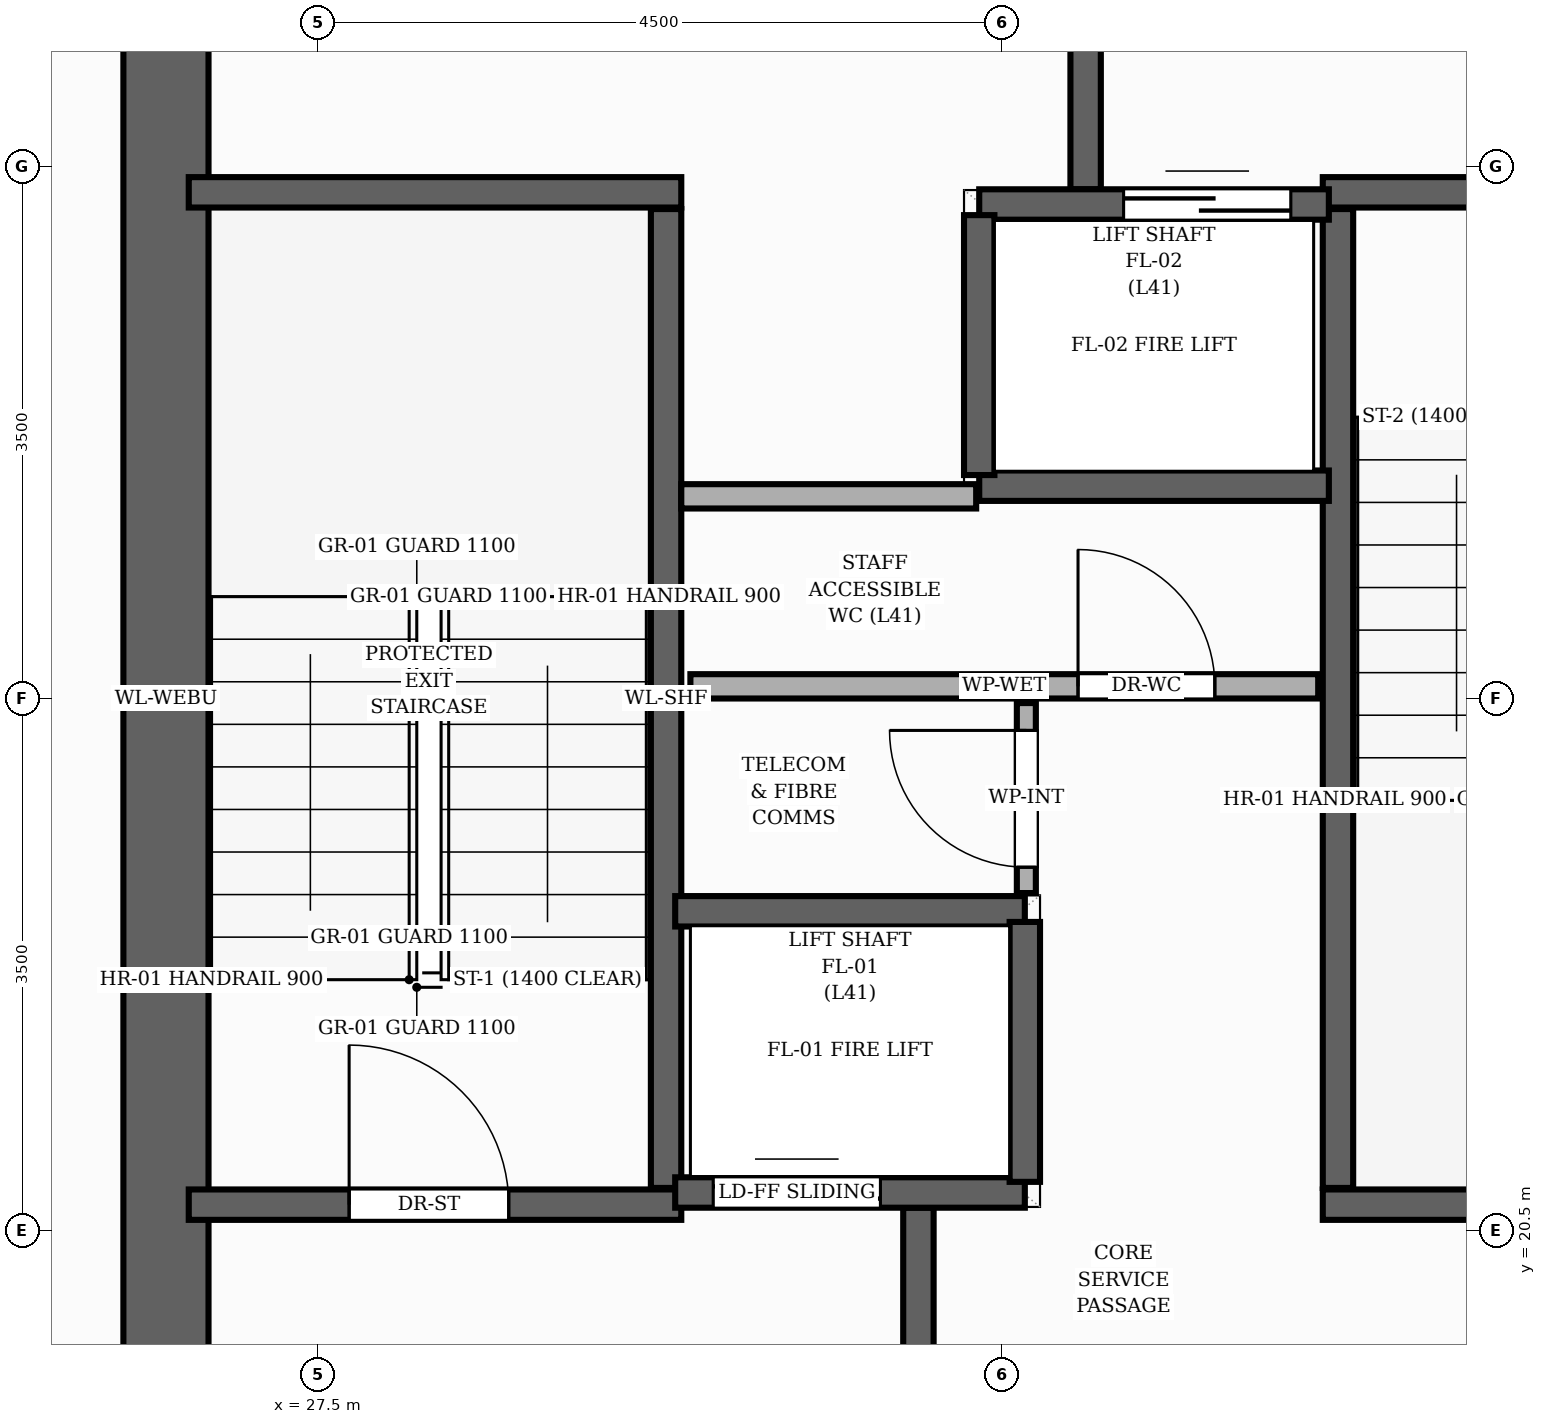
"""IFC4 building model, lengths in metres.
Left out: names, types, materials, properties, quantities, classifications, styles, units other than length and angle.
Written with IfcOpenShell. Run it as: python <this file> out.ifc"""

import sys

from ifc_helpers import new_model, si_unit, direction, frame, frame_2d, origin, place, context, subcontext, project, spatial, rectangle, extrude, element, fill, save


model = new_model("IFC4")
c1 = context("Model", 3, precision=1e-05, world=origin(), true_north=direction((0.0, 1.0)))
c2 = subcontext(c1, "Body", "Model", "MODEL_VIEW")
j1 = project(units=[si_unit("LENGTHUNIT", "METRE"), si_unit("PLANEANGLEUNIT", "RADIAN")], contexts=[c1])
p1 = place(None, origin())
s1 = spatial("IfcSite", under=j1, at=p1, CompositionType="ELEMENT")
p2 = place(p1, origin())
s2 = spatial("IfcBuilding", under=s1, at=p2, CompositionType="ELEMENT")
p3 = place(p2, frame((0.0, 0.0, 136.16)))
s3 = spatial("IfcBuildingStorey", under=s2, at=p3, CompositionType="ELEMENT", Elevation=136.16)
p4 = place(p3, frame((26.5, 17.3, 0.0), z_axis=(0.0, 0.0, 1.0), x_axis=(0.0, 1.0, 0.0)))
e1 = element("IfcWall", 1, at=p4, inside=s3, PredefinedType="SHEAR", context=c2, shape_type="SweptSolid", body=[
    extrude(rectangle(XDim=13.4, YDim=0.56, at=frame_2d((6.7, 0.0))), origin(), (0.0, 0.0, 1.0), 3.2),
])
p5 = place(p3, frame((29.79, 20.78, 0.0), z_axis=(0.0, 0.0, 1.0), x_axis=(0.0, 1.0, 0.0)))
e2 = element("IfcWall", 2, at=p5, inside=s3, PredefinedType="SHEAR", context=c2, shape_type="SweptSolid", body=[
    extrude(rectangle(XDim=6.44, YDim=0.2, at=frame_2d((3.22, 0.0))), origin(), (0.0, 0.0, 1.0), 3.2),
])
p6 = place(p3, frame((26.65, 27.33, 0.0), z_axis=(0.0, 0.0, 1.0), x_axis=(1.0, 0.0, 0.0)))
e3 = element("IfcWall", 3, at=p6, inside=s3, PredefinedType="SHEAR", context=c2, shape_type="SweptSolid", body=[
    extrude(rectangle(XDim=3.24, YDim=0.2, at=frame_2d((1.62, 0.0))), origin(), (0.0, 0.0, 1.0), 3.2),
])
p7 = place(p3, frame((26.65, 20.67, 0.0), z_axis=(0.0, 0.0, 1.0), x_axis=(1.0, 0.0, 0.0)))
e4 = element("IfcWall", 4, at=p7, inside=s3, PredefinedType="SHEAR", context=c2, shape_type="SweptSolid", body=[
    extrude(rectangle(XDim=3.24, YDim=0.2, at=frame_2d((1.62, 0.0))), origin(), (0.0, 0.0, 1.0), 3.2),
])
p8 = place(p7, frame((1.055, 0.0, 0.0)))
e5 = element("IfcOpeningElement", 5, at=p8, cuts=e4, PredefinedType="OPENING", context=c2, shape_type="SweptSolid", body=[
    extrude(rectangle(XDim=1.05, YDim=2.15, at=frame_2d((0.525, 1.075))), frame((0.0, 0.11, 0.0), z_axis=(0.0, -1.0, 0.0), x_axis=(1.0, 0.0, 0.0)), (0.0, 0.0, 1.0), 0.22),
])
p9 = place(p3, frame((34.21, 20.78, 0.0), z_axis=(0.0, 0.0, 1.0), x_axis=(0.0, 1.0, 0.0)))
e6 = element("IfcWall", 6, at=p9, inside=s3, PredefinedType="SHEAR", context=c2, shape_type="SweptSolid", body=[
    extrude(rectangle(XDim=6.44, YDim=0.2, at=frame_2d((3.22, 0.0))), origin(), (0.0, 0.0, 1.0), 3.2),
])
p10 = place(p3, frame((34.11, 20.67, 0.0), z_axis=(0.0, 0.0, 1.0), x_axis=(1.0, 0.0, 0.0)))
e7 = element("IfcWall", 7, at=p10, inside=s3, PredefinedType="SHEAR", context=c2, shape_type="SweptSolid", body=[
    extrude(rectangle(XDim=3.24, YDim=0.2, at=frame_2d((1.62, 0.0))), origin(), (0.0, 0.0, 1.0), 3.2),
])
p11 = place(p3, frame((34.11, 27.33, 0.0), z_axis=(0.0, 0.0, 1.0), x_axis=(1.0, 0.0, 0.0)))
e8 = element("IfcWall", 8, at=p11, inside=s3, PredefinedType="SHEAR", context=c2, shape_type="SweptSolid", body=[
    extrude(rectangle(XDim=3.24, YDim=0.2, at=frame_2d((1.62, 0.0))), origin(), (0.0, 0.0, 1.0), 3.2),
])
p12 = place(p11, frame((1.135, 0.0, 0.0)))
e9 = element("IfcOpeningElement", 9, at=p12, cuts=e8, PredefinedType="OPENING", context=c2, shape_type="SweptSolid", body=[
    extrude(rectangle(XDim=1.05, YDim=2.15, at=frame_2d((0.525, 1.075))), frame((0.0, 0.11, 0.0), z_axis=(0.0, -1.0, 0.0), x_axis=(1.0, 0.0, 0.0)), (0.0, 0.0, 1.0), 0.22),
])
for number, where, z_axis, x_axis in (
    (10, (31.45, 17.15, 0.0), (0.0, 0.0, 1.0), (0.0, 1.0, 0.0)),
    (11, (32.55, 27.35, 0.0), (0.0, 0.0, 1.0), (0.0, 1.0, 0.0)),
):
    element("IfcWall", number, at=place(p3, frame(where, z_axis=z_axis, x_axis=x_axis)), inside=s3, PredefinedType="SHEAR", context=c2, shape_type="SweptSolid", body=[
        extrude(rectangle(XDim=3.5, YDim=0.2, at=frame_2d((1.75, 0.0))), origin(), (0.0, 0.0, 1.0), 3.2),
    ])
p13 = place(p3, frame((29.85, 20.75, 0.0), z_axis=(0.0, 0.0, 1.0), x_axis=(1.0, 0.0, 0.0)))
e12 = element("IfcWall", 12, at=p13, inside=s3, PredefinedType="SHEAR", context=c2, shape_type="SweptSolid", body=[
    extrude(rectangle(XDim=2.3, YDim=0.2, at=frame_2d((1.15, 0.0))), origin(), (0.0, 0.0, 1.0), 3.2),
])
p14 = place(p13, frame((0.25, 0.0, 0.0)))
e13 = element("IfcOpeningElement", 13, at=p14, cuts=e12, PredefinedType="OPENING", context=c2, shape_type="SweptSolid", body=[
    extrude(rectangle(XDim=1.1, YDim=2.15, at=frame_2d((0.55, 1.075))), frame((0.0, 0.11, 0.0), z_axis=(0.0, -1.0, 0.0), x_axis=(1.0, 0.0, 0.0)), (0.0, 0.0, 1.0), 0.22),
])
p15 = place(p3, frame((29.85, 22.6, 0.0), z_axis=(0.0, 0.0, 1.0), x_axis=(1.0, 0.0, 0.0)))
e14 = element("IfcWall", 14, at=p15, inside=s3, PredefinedType="SHEAR", context=c2, shape_type="SweptSolid", body=[
    extrude(rectangle(XDim=2.3, YDim=0.2, at=frame_2d((1.15, 0.0))), origin(), (0.0, 0.0, 1.0), 3.2),
])
p16 = place(p3, frame((32.15, 20.82, 0.0), z_axis=(0.0, 0.0, 1.0), x_axis=(0.0, 1.0, 0.0)))
e15 = element("IfcWall", 15, at=p16, inside=s3, PredefinedType="SHEAR", context=c2, shape_type="SweptSolid", body=[
    extrude(rectangle(XDim=1.71, YDim=0.2, at=frame_2d((0.855, 0.0))), origin(), (0.0, 0.0, 1.0), 3.2),
])
p17 = place(p3, frame((31.85, 27.25, 0.0), z_axis=(0.0, 0.0, 1.0), x_axis=(1.0, 0.0, 0.0)))
e16 = element("IfcWall", 16, at=p17, inside=s3, PredefinedType="SHEAR", context=c2, shape_type="SweptSolid", body=[
    extrude(rectangle(XDim=2.3, YDim=0.2, at=frame_2d((1.15, 0.0))), origin(), (0.0, 0.0, 1.0), 3.2),
])
p18 = place(p17, frame((0.95, 0.0, 0.0)))
e17 = element("IfcOpeningElement", 17, at=p18, cuts=e16, PredefinedType="OPENING", context=c2, shape_type="SweptSolid", body=[
    extrude(rectangle(XDim=1.1, YDim=2.15, at=frame_2d((0.55, 1.075))), frame((0.0, 0.11, 0.0), z_axis=(0.0, -1.0, 0.0), x_axis=(1.0, 0.0, 0.0)), (0.0, 0.0, 1.0), 0.22),
])
p19 = place(p3, frame((31.85, 25.4, 0.0), z_axis=(0.0, 0.0, 1.0), x_axis=(1.0, 0.0, 0.0)))
e18 = element("IfcWall", 18, at=p19, inside=s3, PredefinedType="SHEAR", context=c2, shape_type="SweptSolid", body=[
    extrude(rectangle(XDim=2.3, YDim=0.2, at=frame_2d((1.15, 0.0))), origin(), (0.0, 0.0, 1.0), 3.2),
])
p20 = place(p3, frame((31.85, 25.47, 0.0), z_axis=(0.0, 0.0, 1.0), x_axis=(0.0, 1.0, 0.0)))
e19 = element("IfcWall", 19, at=p20, inside=s3, PredefinedType="SHEAR", context=c2, shape_type="SweptSolid", body=[
    extrude(rectangle(XDim=1.71, YDim=0.2, at=frame_2d((0.855, 0.0))), origin(), (0.0, 0.0, 1.0), 3.2),
])
p21 = place(p3, frame((29.95, 24.08, 0.0), z_axis=(0.0, 0.0, 1.0), x_axis=(1.0, 0.0, 0.0)))
e20 = element("IfcWall", 20, at=p21, inside=s3, PredefinedType="PLUMBINGWALL", context=c2, shape_type="SweptSolid", body=[
    extrude(rectangle(XDim=4.13, YDim=0.16, at=frame_2d((2.065, 0.0))), origin(), (0.0, 0.0, 1.0), 2.955),
])
p22 = place(p21, frame((2.55, 0.0, 0.0)))
e21 = element("IfcOpeningElement", 21, at=p22, cuts=e20, PredefinedType="OPENING", context=c2, shape_type="SweptSolid", body=[
    extrude(rectangle(XDim=0.9, YDim=2.1, at=frame_2d((0.45, 1.05))), frame((0.0, 0.09, 0.0), z_axis=(0.0, -1.0, 0.0), x_axis=(1.0, 0.0, 0.0)), (0.0, 0.0, 1.0), 0.18),
])
p23 = place(p3, frame((32.16, 22.72, 0.0), z_axis=(0.0, 0.0, 1.0), x_axis=(0.0, 1.0, 0.0)))
e22 = element("IfcWall", 22, at=p23, inside=s3, PredefinedType="PARTITIONING", context=c2, shape_type="SweptSolid", body=[
    extrude(rectangle(XDim=1.25, YDim=0.125, at=frame_2d((0.625, 0.0))), origin(), (0.0, 0.0, 1.0), 2.955),
])
p24 = place(p23, frame((0.17, 0.0, 0.0)))
e23 = element("IfcOpeningElement", 23, at=p24, cuts=e22, PredefinedType="OPENING", context=c2, shape_type="SweptSolid", body=[
    extrude(rectangle(XDim=0.9, YDim=2.1, at=frame_2d((0.45, 1.05))), frame((0.0, 0.073, 0.0), z_axis=(0.0, -1.0, 0.0), x_axis=(1.0, 0.0, 0.0)), (0.0, 0.0, 1.0), 0.145),
])
p25 = place(p3, frame((29.89, 25.33, 0.0), z_axis=(0.0, 0.0, 1.0), x_axis=(1.0, 0.0, 0.0)))
e24 = element("IfcWall", 24, at=p25, inside=s3, PredefinedType="PLUMBINGWALL", context=c2, shape_type="SweptSolid", body=[
    extrude(rectangle(XDim=1.94, YDim=0.16, at=frame_2d((0.97, 0.0))), origin(), (0.0, 0.0, 1.0), 2.955),
])
p26 = place(p8, origin())
e25 = element("IfcDoor", 25, at=p26, inside=s3, OperationType="SINGLE_SWING_LEFT", PredefinedType="DOOR", context=c2, shape_type="SweptSolid", body=[
    extrude(rectangle(XDim=1.05, YDim=2.15, at=frame_2d((0.525, 1.075))), frame((0.0, 0.025, 0.0), z_axis=(0.0, -1.0, 0.0), x_axis=(1.0, 0.0, 0.0)), (0.0, 0.0, 1.0), 0.05),
])
fill(e5, e25)
p27 = place(p14, origin())
e26 = element("IfcDoor", 26, at=p27, inside=s3, OperationType="DOUBLE_DOOR_SLIDING", PredefinedType="DOOR", context=c2, shape_type="SweptSolid", body=[
    extrude(rectangle(XDim=1.1, YDim=2.15, at=frame_2d((0.55, 1.075))), frame((0.0, 0.025, 0.0), z_axis=(0.0, -1.0, 0.0), x_axis=(1.0, 0.0, 0.0)), (0.0, 0.0, 1.0), 0.05),
])
fill(e13, e26)
p28 = place(p18, origin())
e27 = element("IfcDoor", 27, at=p28, inside=s3, OperationType="DOUBLE_DOOR_SLIDING", PredefinedType="DOOR", context=c2, shape_type="SweptSolid", body=[
    extrude(rectangle(XDim=1.1, YDim=2.15, at=frame_2d((0.55, 1.075))), frame((0.0, 0.025, 0.0), z_axis=(0.0, -1.0, 0.0), x_axis=(1.0, 0.0, 0.0)), (0.0, 0.0, 1.0), 0.05),
])
fill(e17, e27)
p29 = place(p22, origin())
e28 = element("IfcDoor", 28, at=p29, inside=s3, OperationType="SINGLE_SWING_LEFT", PredefinedType="DOOR", context=c2, shape_type="SweptSolid", body=[
    extrude(rectangle(XDim=0.9, YDim=2.1, at=frame_2d((0.45, 1.05))), frame((0.0, 0.025, 0.0), z_axis=(0.0, -1.0, 0.0), x_axis=(1.0, 0.0, 0.0)), (0.0, 0.0, 1.0), 0.05),
])
fill(e21, e28)
p30 = place(p24, origin())
e29 = element("IfcDoor", 29, at=p30, inside=s3, OperationType="SINGLE_SWING_RIGHT", PredefinedType="DOOR", context=c2, shape_type="SweptSolid", body=[
    extrude(rectangle(XDim=0.9, YDim=2.1, at=frame_2d((0.45, 1.05))), frame((0.0, 0.025, 0.0), z_axis=(0.0, -1.0, 0.0), x_axis=(1.0, 0.0, 0.0)), (0.0, 0.0, 1.0), 0.05),
])
fill(e23, e29)
save(model, sys.argv[1])
